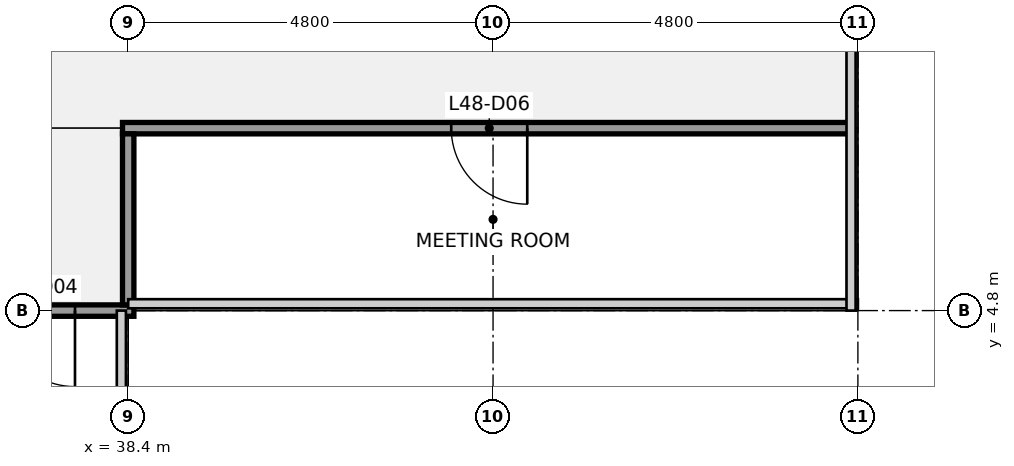
"""IFC4 building model, lengths in metres.
Left out: names, types, materials, properties, quantities, classifications, styles, units other than length and angle.
Written with IfcOpenShell. Run it as: python <this file> out.ifc"""

import sys

from ifc_helpers import new_model, si_unit, direction, frame, frame_2d, origin, place, context, subcontext, project, spatial, rectangle, extrude, element, fill, save


model = new_model("IFC4")
c1 = context("Model", 3, precision=1e-05, world=origin(), true_north=direction((0.0, 1.0)))
c2 = subcontext(c1, "Body", "Model", "MODEL_VIEW")
j1 = project(units=[si_unit("LENGTHUNIT", "METRE"), si_unit("PLANEANGLEUNIT", "RADIAN")], contexts=[c1])
p1 = place(None, origin())
s1 = spatial("IfcSite", under=j1, at=p1, CompositionType="ELEMENT")
p2 = place(p1, origin())
s2 = spatial("IfcBuilding", under=s1, at=p2, CompositionType="ELEMENT")
p3 = place(p2, frame((0.0, 0.0, 221.2)))
s3 = spatial("IfcBuildingStorey", under=s2, at=p3, CompositionType="ELEMENT", Elevation=221.2)
p4 = place(p3, frame((19.125, 4.8, 0.0), z_axis=(0.0, 0.0, 1.0), x_axis=(1.0, 0.0, 0.0)))
e1 = element("IfcWall", 1, at=p4, inside=s3, PredefinedType="PARTITIONING", context=c2, shape_type="SweptSolid", body=[
    extrude(rectangle(XDim=19.35, YDim=0.15, at=frame_2d((9.675, 0.0))), origin(), (0.0, 0.0, 1.0), 2.87),
])
p5 = place(p4, frame((4.375, 0.0, 0.0)))
e2 = element("IfcOpeningElement", 2, at=p5, cuts=e1, PredefinedType="OPENING", context=c2, shape_type="SweptSolid", body=[
    extrude(rectangle(XDim=1.0, YDim=2.1, at=frame_2d((0.5, 1.05))), frame((0.0, 0.085, 0.0), z_axis=(0.0, -1.0, 0.0), x_axis=(1.0, 0.0, 0.0)), (0.0, 0.0, 1.0), 0.17),
])
p6 = place(p4, frame((10.375, 0.0, 0.0)))
e3 = element("IfcOpeningElement", 3, at=p6, cuts=e1, PredefinedType="OPENING", context=c2, shape_type="SweptSolid", body=[
    extrude(rectangle(XDim=1.0, YDim=2.1, at=frame_2d((0.5, 1.05))), frame((0.0, 0.085, 0.0), z_axis=(0.0, -1.0, 0.0), x_axis=(1.0, 0.0, 0.0)), (0.0, 0.0, 1.0), 0.17),
])
p7 = place(p4, frame((13.975, 0.0, 0.0)))
e4 = element("IfcOpeningElement", 4, at=p7, cuts=e1, PredefinedType="OPENING", context=c2, shape_type="SweptSolid", body=[
    extrude(rectangle(XDim=1.0, YDim=2.1, at=frame_2d((0.5, 1.05))), frame((0.0, 0.085, 0.0), z_axis=(0.0, -1.0, 0.0), x_axis=(1.0, 0.0, 0.0)), (0.0, 0.0, 1.0), 0.17),
])
p8 = place(p4, frame((17.575, 0.0, 0.0)))
e5 = element("IfcOpeningElement", 5, at=p8, cuts=e1, PredefinedType="OPENING", context=c2, shape_type="SweptSolid", body=[
    extrude(rectangle(XDim=1.0, YDim=2.1, at=frame_2d((0.5, 1.05))), frame((0.0, 0.085, 0.0), z_axis=(0.0, -1.0, 0.0), x_axis=(1.0, 0.0, 0.0)), (0.0, 0.0, 1.0), 0.17),
])
p9 = place(p3, frame((38.325, 7.2, 0.0), z_axis=(0.0, 0.0, 1.0), x_axis=(1.0, 0.0, 0.0)))
e6 = element("IfcWall", 6, at=p9, inside=s3, PredefinedType="PARTITIONING", context=c2, shape_type="SweptSolid", body=[
    extrude(rectangle(XDim=9.575, YDim=0.15, at=frame_2d((4.788, 0.0))), origin(), (0.0, 0.0, 1.0), 2.87),
])
p10 = place(p9, frame((4.325, 0.0, 0.0)))
e7 = element("IfcOpeningElement", 7, at=p10, cuts=e6, PredefinedType="OPENING", context=c2, shape_type="SweptSolid", body=[
    extrude(rectangle(XDim=1.0, YDim=2.1, at=frame_2d((0.5, 1.05))), frame((0.0, 0.085, 0.0), z_axis=(0.0, -1.0, 0.0), x_axis=(1.0, 0.0, 0.0)), (0.0, 0.0, 1.0), 0.17),
])
p11 = place(p3, frame((38.4, 4.875, 0.0), z_axis=(0.0, 0.0, 1.0), x_axis=(0.0, 1.0, 0.0)))
e8 = element("IfcWall", 8, at=p11, inside=s3, PredefinedType="PARTITIONING", context=c2, shape_type="SweptSolid", body=[
    extrude(rectangle(XDim=2.25, YDim=0.15, at=frame_2d((1.125, 0.0))), origin(), (0.0, 0.0, 1.0), 2.87),
])
p12 = place(p8, origin())
e9 = element("IfcDoor", 9, at=p12, inside=s3, OperationType="SINGLE_SWING_RIGHT", PredefinedType="DOOR", context=c2, shape_type="SweptSolid", body=[
    extrude(rectangle(XDim=1.0, YDim=2.1, at=frame_2d((0.5, 1.05))), frame((0.0, 0.025, 0.0), z_axis=(0.0, -1.0, 0.0), x_axis=(1.0, 0.0, 0.0)), (0.0, 0.0, 1.0), 0.05),
])
fill(e5, e9)
p13 = place(p10, origin())
e10 = element("IfcDoor", 10, at=p13, inside=s3, OperationType="SINGLE_SWING_RIGHT", PredefinedType="DOOR", context=c2, shape_type="SweptSolid", body=[
    extrude(rectangle(XDim=1.0, YDim=2.1, at=frame_2d((0.5, 1.05))), frame((0.0, 0.025, 0.0), z_axis=(0.0, -1.0, 0.0), x_axis=(1.0, 0.0, 0.0)), (0.0, 0.0, 1.0), 0.05),
])
fill(e7, e10)
save(model, sys.argv[1])
